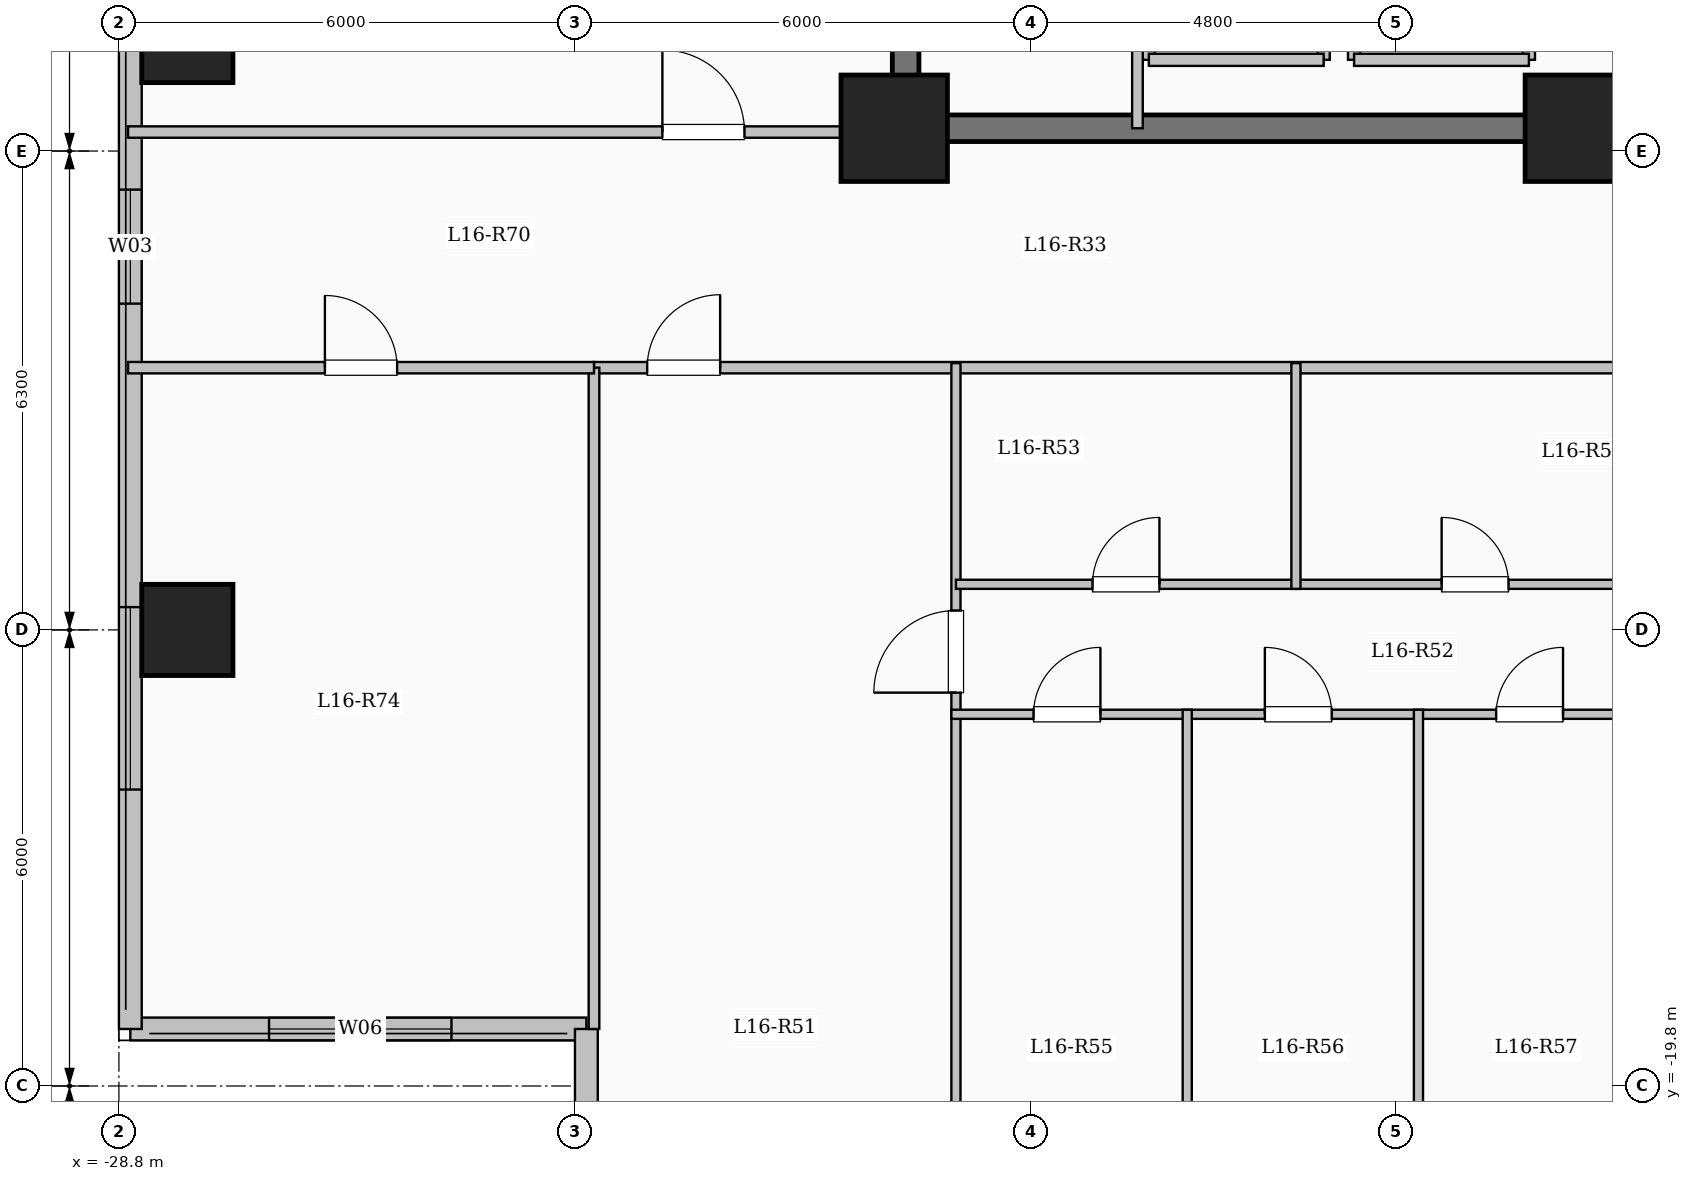
"""IFC4 building model, lengths in metres.
Left out: names, types, materials, properties, quantities, classifications, styles, units other than length and angle.
Written with IfcOpenShell. Run it as: python <this file> out.ifc"""

import sys

from ifc_helpers import new_model, si_unit, direction, frame, frame_2d, origin, origin_2d, place, context, subcontext, project, spatial, rectangle, extrude, element, fill, save


model = new_model("IFC4")
c1 = context("Model", 3, precision=1e-05, world=origin(), true_north=direction((0.0, 1.0)))
c2 = subcontext(c1, "Body", "Model", "MODEL_VIEW")
j1 = project(units=[si_unit("LENGTHUNIT", "METRE"), si_unit("PLANEANGLEUNIT", "RADIAN")], contexts=[c1])
p1 = place(None, origin())
s1 = spatial("IfcSite", under=j1, at=p1, CompositionType="ELEMENT")
p2 = place(p1, origin())
s2 = spatial("IfcBuilding", under=s1, at=p2, CompositionType="ELEMENT")
p3 = place(p2, frame((0.0, 0.0, 60.85)))
s3 = spatial("IfcBuildingStorey", under=s2, at=p3, CompositionType="ELEMENT", Elevation=60.85)
for number, where, z_axis, x_axis in (
    (1, (-9.6, -7.2, 0.0), (0.0, 0.0, 1.0), (1.0, 0.0, 0.0)),
    (2, (-18.6, -7.2, 0.0), (0.0, 0.0, 1.0), (1.0, 0.0, 0.0)),
):
    element("IfcColumn", number, at=place(p3, frame(where, z_axis=z_axis, x_axis=x_axis)), inside=s3, PredefinedType="COLUMN", context=c2, shape_type="SweptSolid", body=[
        extrude(rectangle(XDim=1.4, YDim=1.4, at=origin_2d()), origin(), (0.0, 0.0, 1.0), 3.35),
    ])
for number, where, z_axis, x_axis in (
    (3, (-27.9, -13.8, 0.0), (0.0, 0.0, 1.0), (1.0, 0.0, 0.0)),
    (4, (-27.9, -6.0, 0.0), (0.0, 0.0, 1.0), (1.0, 0.0, 0.0)),
):
    element("IfcColumn", number, at=place(p3, frame(where, z_axis=z_axis, x_axis=x_axis)), inside=s3, PredefinedType="COLUMN", context=c2, shape_type="SweptSolid", body=[
        extrude(rectangle(XDim=1.2, YDim=1.2, at=origin_2d()), origin(), (0.0, 0.0, 1.0), 3.35),
    ])
p4 = place(p3, frame((-22.65, -19.05, 0.0), z_axis=(0.0, 0.0, 1.0), x_axis=(-1.0, 0.0, 0.0)))
e5 = element("IfcWall", 5, at=p4, inside=s3, PredefinedType="SOLIDWALL", context=c2, shape_type="SweptSolid", body=[
    extrude(rectangle(XDim=6.0, YDim=0.3, at=frame_2d((3.0, 0.0))), origin(), (0.0, 0.0, 1.0), 3.05),
])
p5 = place(p4, frame((1.775, 0.0, 0.9)))
e6 = element("IfcOpeningElement", 6, at=p5, cuts=e5, PredefinedType="OPENING", context=c2, shape_type="SweptSolid", body=[
    extrude(rectangle(XDim=2.4, YDim=1.8, at=frame_2d((1.2, 0.9))), frame((0.0, 0.16, 0.0), z_axis=(0.0, -1.0, 0.0), x_axis=(1.0, 0.0, 0.0)), (0.0, 0.0, 1.0), 0.32),
])
p6 = place(p3, frame((-28.65, -19.05, 0.0), z_axis=(0.0, 0.0, 1.0), x_axis=(0.0, 1.0, 0.0)))
e7 = element("IfcWall", 7, at=p6, inside=s3, PredefinedType="SOLIDWALL", context=c2, shape_type="SweptSolid", body=[
    extrude(rectangle(XDim=38.1, YDim=0.3, at=frame_2d((19.05, 0.0))), origin(), (0.0, 0.0, 1.0), 3.05),
])
p7 = place(p6, frame((3.15, 0.0, 0.9)))
e8 = element("IfcOpeningElement", 8, at=p7, cuts=e7, PredefinedType="OPENING", context=c2, shape_type="SweptSolid", body=[
    extrude(rectangle(XDim=2.4, YDim=1.8, at=frame_2d((1.2, 0.9))), frame((0.0, 0.16, 0.0), z_axis=(0.0, -1.0, 0.0), x_axis=(1.0, 0.0, 0.0)), (0.0, 0.0, 1.0), 0.32),
])
p8 = place(p6, frame((9.542, 0.0, 0.9)))
e9 = element("IfcOpeningElement", 9, at=p8, cuts=e7, PredefinedType="OPENING", context=c2, shape_type="SweptSolid", body=[
    extrude(rectangle(XDim=1.5, YDim=1.65, at=frame_2d((0.75, 0.825))), frame((0.0, 0.16, 0.0), z_axis=(0.0, -1.0, 0.0), x_axis=(1.0, 0.0, 0.0)), (0.0, 0.0, 1.0), 0.32),
])
p9 = place(p6, frame((19.8, 0.0, 0.9)))
e10 = element("IfcOpeningElement", 10, at=p9, cuts=e7, PredefinedType="OPENING", context=c2, shape_type="SweptSolid", body=[
    extrude(rectangle(XDim=2.0, YDim=1.7, at=frame_2d((1.0, 0.85))), frame((0.0, 0.16, 0.0), z_axis=(0.0, -1.0, 0.0), x_axis=(1.0, 0.0, 0.0)), (0.0, 0.0, 1.0), 0.32),
])
p10 = place(p6, frame((30.175, 0.0, 0.95)))
e11 = element("IfcOpeningElement", 11, at=p10, cuts=e7, PredefinedType="OPENING", context=c2, shape_type="SweptSolid", body=[
    extrude(rectangle(XDim=1.0, YDim=1.5, at=frame_2d((0.5, 0.75))), frame((0.0, 0.16, 0.0), z_axis=(0.0, -1.0, 0.0), x_axis=(1.0, 0.0, 0.0)), (0.0, 0.0, 1.0), 0.32),
])
p11 = place(p6, frame((33.85, 0.0, 0.9)))
e12 = element("IfcOpeningElement", 12, at=p11, cuts=e7, PredefinedType="OPENING", context=c2, shape_type="SweptSolid", body=[
    extrude(rectangle(XDim=2.0, YDim=1.7, at=frame_2d((1.0, 0.85))), frame((0.0, 0.16, 0.0), z_axis=(0.0, -1.0, 0.0), x_axis=(1.0, 0.0, 0.0)), (0.0, 0.0, 1.0), 0.32),
])
p12 = place(p3, frame((-22.65, -23.55, 0.0), z_axis=(0.0, 0.0, 1.0), x_axis=(0.0, 1.0, 0.0)))
e13 = element("IfcWall", 13, at=p12, inside=s3, PredefinedType="SOLIDWALL", context=c2, shape_type="SweptSolid", body=[
    extrude(rectangle(XDim=4.5, YDim=0.3, at=frame_2d((2.25, 0.0))), origin(), (0.0, 0.0, 1.0), 3.05),
])
p13 = place(p12, frame((1.067, 0.0, 0.9)))
e14 = element("IfcOpeningElement", 14, at=p13, cuts=e13, PredefinedType="OPENING", context=c2, shape_type="SweptSolid", body=[
    extrude(rectangle(XDim=2.4, YDim=1.8, at=frame_2d((1.2, 0.9))), frame((0.0, 0.16, 0.0), z_axis=(0.0, -1.0, 0.0), x_axis=(1.0, 0.0, 0.0)), (0.0, 0.0, 1.0), 0.32),
])
p14 = place(p3, frame((-12.55, -6.3, 0.0), z_axis=(0.0, 0.0, 1.0), x_axis=(0.0, 1.0, 0.0)))
e15 = element("IfcWall", 15, at=p14, inside=s3, PredefinedType="SOLIDWALL", context=c2, shape_type="SweptSolid", body=[
    extrude(rectangle(XDim=2.6, YDim=0.16, at=frame_2d((1.3, 0.0))), origin(), (0.0, 0.0, 1.0), 3.05),
])
p15 = place(p3, frame((-10.25, -6.3, 0.0), z_axis=(0.0, 0.0, 1.0), x_axis=(0.0, 1.0, 0.0)))
e16 = element("IfcWall", 16, at=p15, inside=s3, PredefinedType="SOLIDWALL", context=c2, shape_type="SweptSolid", body=[
    extrude(rectangle(XDim=2.6, YDim=0.16, at=frame_2d((1.3, 0.0))), origin(), (0.0, 0.0, 1.0), 3.05),
])
p16 = place(p15, frame((0.75, 0.0, 0.0)))
e17 = element("IfcOpeningElement", 17, at=p16, cuts=e16, PredefinedType="OPENING", context=c2, shape_type="SweptSolid", body=[
    extrude(rectangle(XDim=1.1, YDim=2.15, at=frame_2d((0.55, 1.075))), frame((0.0, 0.09, 0.0), z_axis=(0.0, -1.0, 0.0), x_axis=(1.0, 0.0, 0.0)), (0.0, 0.0, 1.0), 0.18),
])
p17 = place(p3, frame((-12.55, -6.3, 0.0), z_axis=(0.0, 0.0, 1.0), x_axis=(1.0, 0.0, 0.0)))
e18 = element("IfcWall", 18, at=p17, inside=s3, PredefinedType="SOLIDWALL", context=c2, shape_type="SweptSolid", body=[
    extrude(rectangle(XDim=2.3, YDim=0.16, at=frame_2d((1.15, 0.0))), origin(), (0.0, 0.0, 1.0), 3.05),
])
for number, where, z_axis, x_axis in (
    (19, (-15.25, -6.3, 0.0), (0.0, 0.0, 1.0), (0.0, 1.0, 0.0)),
    (20, (-12.95, -6.3, 0.0), (0.0, 0.0, 1.0), (0.0, 1.0, 0.0)),
):
    element("IfcWall", number, at=place(p3, frame(where, z_axis=z_axis, x_axis=x_axis)), inside=s3, PredefinedType="SOLIDWALL", context=c2, shape_type="SweptSolid", body=[
        extrude(rectangle(XDim=2.6, YDim=0.16, at=frame_2d((1.3, 0.0))), origin(), (0.0, 0.0, 1.0), 3.05),
    ])
p18 = place(p3, frame((-15.25, -6.3, 0.0), z_axis=(0.0, 0.0, 1.0), x_axis=(1.0, 0.0, 0.0)))
e21 = element("IfcWall", 21, at=p18, inside=s3, PredefinedType="SOLIDWALL", context=c2, shape_type="SweptSolid", body=[
    extrude(rectangle(XDim=2.3, YDim=0.16, at=frame_2d((1.15, 0.0))), origin(), (0.0, 0.0, 1.0), 3.05),
])
p19 = place(p3, frame((-18.45, -7.375, 0.0), z_axis=(0.0, 0.0, 1.0), x_axis=(0.0, 1.0, 0.0)))
e22 = element("IfcWall", 22, at=p19, inside=s3, PredefinedType="SHEAR", context=c2, shape_type="SweptSolid", body=[
    extrude(rectangle(XDim=14.05, YDim=0.35, at=frame_2d((7.025, 0.0))), origin(), (0.0, 0.0, 1.0), 3.35),
])
p20 = place(p3, frame((-18.625, -7.2, 0.0), z_axis=(0.0, 0.0, 1.0), x_axis=(1.0, 0.0, 0.0)))
e23 = element("IfcWall", 23, at=p20, inside=s3, PredefinedType="SHEAR", context=c2, shape_type="SweptSolid", body=[
    extrude(rectangle(XDim=8.55, YDim=0.35, at=frame_2d((4.275, 0.0))), origin(), (0.0, 0.0, 1.0), 3.35),
])
p21 = place(p3, frame((-15.4, -7.2, 0.0), z_axis=(0.0, 0.0, 1.0), x_axis=(0.0, 1.0, 0.0)))
e24 = element("IfcWall", 24, at=p21, inside=s3, PredefinedType="PARTITIONING", context=c2, shape_type="SweptSolid", body=[
    extrude(rectangle(XDim=10.45, YDim=0.14, at=frame_2d((5.225, 0.0))), origin(), (0.0, 0.0, 1.0), 3.05),
])
p22 = place(p21, frame((9.25, 0.0, 0.0)))
e25 = element("IfcOpeningElement", 25, at=p22, cuts=e24, PredefinedType="OPENING", context=c2, shape_type="SweptSolid", body=[
    extrude(rectangle(XDim=0.9, YDim=2.08, at=frame_2d((0.45, 1.04))), frame((0.0, 0.08, 0.0), z_axis=(0.0, -1.0, 0.0), x_axis=(1.0, 0.0, 0.0)), (0.0, 0.0, 1.0), 0.16),
])
p23 = place(p3, frame((-22.55, -10.35, 0.0), z_axis=(0.0, 0.0, 1.0), x_axis=(1.0, 0.0, 0.0)))
e26 = element("IfcWall", 26, at=p23, inside=s3, PredefinedType="PARTITIONING", context=c2, shape_type="SweptSolid", body=[
    extrude(rectangle(XDim=14.0, YDim=0.15, at=frame_2d((7.0, 0.0))), origin(), (0.0, 0.0, 1.0), 3.05),
])
p24 = place(p23, frame((0.7, 0.0, 0.0)))
e27 = element("IfcOpeningElement", 27, at=p24, cuts=e26, PredefinedType="OPENING", context=c2, shape_type="SweptSolid", body=[
    extrude(rectangle(XDim=0.96, YDim=2.15, at=frame_2d((0.48, 1.075))), frame((0.0, 0.085, 0.0), z_axis=(0.0, -1.0, 0.0), x_axis=(1.0, 0.0, 0.0)), (0.0, 0.0, 1.0), 0.17),
])
p25 = place(p3, frame((-17.788, -23.6, 0.0), z_axis=(0.0, 0.0, 1.0), x_axis=(0.0, 1.0, 0.0)))
e28 = element("IfcWall", 28, at=p25, inside=s3, PredefinedType="PARTITIONING", context=c2, shape_type="SweptSolid", body=[
    extrude(rectangle(XDim=13.31, YDim=0.12, at=frame_2d((6.655, 0.0))), origin(), (0.0, 0.0, 1.0), 3.05),
])
p26 = place(p25, frame((8.975, 0.0, 0.0)))
e29 = element("IfcOpeningElement", 29, at=p26, cuts=e28, PredefinedType="OPENING", context=c2, shape_type="SweptSolid", body=[
    extrude(rectangle(XDim=1.08, YDim=2.15, at=frame_2d((0.54, 1.075))), frame((0.0, 0.07, 0.0), z_axis=(0.0, -1.0, 0.0), x_axis=(1.0, 0.0, 0.0)), (0.0, 0.0, 1.0), 0.14),
])
p27 = place(p3, frame((-17.788, -13.2, 0.0), z_axis=(0.0, 0.0, 1.0), x_axis=(1.0, 0.0, 0.0)))
e30 = element("IfcWall", 30, at=p27, inside=s3, PredefinedType="PARTITIONING", context=c2, shape_type="SweptSolid", body=[
    extrude(rectangle(XDim=4.473, YDim=0.12, at=frame_2d((2.237, 0.0))), origin(), (0.0, 0.0, 1.0), 3.05),
])
p28 = place(p27, frame((1.797, 0.0, 0.0)))
e31 = element("IfcOpeningElement", 31, at=p28, cuts=e30, PredefinedType="OPENING", context=c2, shape_type="SweptSolid", body=[
    extrude(rectangle(XDim=0.88, YDim=2.1, at=frame_2d((0.44, 1.05))), frame((0.0, 0.07, 0.0), z_axis=(0.0, -1.0, 0.0), x_axis=(1.0, 0.0, 0.0)), (0.0, 0.0, 1.0), 0.14),
])
p29 = place(p3, frame((-13.315, -13.2, 0.0), z_axis=(0.0, 0.0, 1.0), x_axis=(1.0, 0.0, 0.0)))
e32 = element("IfcWall", 32, at=p29, inside=s3, PredefinedType="PARTITIONING", context=c2, shape_type="SweptSolid", body=[
    extrude(rectangle(XDim=4.715, YDim=0.12, at=frame_2d((2.357, 0.0))), origin(), (0.0, 0.0, 1.0), 3.05),
])
p30 = place(p29, frame((1.917, 0.0, 0.0)))
e33 = element("IfcOpeningElement", 33, at=p30, cuts=e32, PredefinedType="OPENING", context=c2, shape_type="SweptSolid", body=[
    extrude(rectangle(XDim=0.88, YDim=2.1, at=frame_2d((0.44, 1.05))), frame((0.0, 0.07, 0.0), z_axis=(0.0, -1.0, 0.0), x_axis=(1.0, 0.0, 0.0)), (0.0, 0.0, 1.0), 0.14),
])
p31 = place(p3, frame((-17.848, -14.91, 0.0), z_axis=(0.0, 0.0, 1.0), x_axis=(1.0, 0.0, 0.0)))
e34 = element("IfcWall", 34, at=p31, inside=s3, PredefinedType="PARTITIONING", context=c2, shape_type="SweptSolid", body=[
    extrude(rectangle(XDim=9.308, YDim=0.12, at=frame_2d((4.654, 0.0))), origin(), (0.0, 0.0, 1.0), 2.535),
])
p32 = place(p31, frame((1.081, 0.0, 0.0)))
e35 = element("IfcOpeningElement", 35, at=p32, cuts=e34, PredefinedType="OPENING", context=c2, shape_type="SweptSolid", body=[
    extrude(rectangle(XDim=0.88, YDim=2.1, at=frame_2d((0.44, 1.05))), frame((0.0, 0.07, 0.0), z_axis=(0.0, -1.0, 0.0), x_axis=(1.0, 0.0, 0.0)), (0.0, 0.0, 1.0), 0.14),
])
p33 = place(p31, frame((4.124, 0.0, 0.0)))
e36 = element("IfcOpeningElement", 36, at=p33, cuts=e34, PredefinedType="OPENING", context=c2, shape_type="SweptSolid", body=[
    extrude(rectangle(XDim=0.88, YDim=2.1, at=frame_2d((0.44, 1.05))), frame((0.0, 0.07, 0.0), z_axis=(0.0, -1.0, 0.0), x_axis=(1.0, 0.0, 0.0)), (0.0, 0.0, 1.0), 0.14),
])
p34 = place(p31, frame((7.167, 0.0, 0.0)))
e37 = element("IfcOpeningElement", 37, at=p34, cuts=e34, PredefinedType="OPENING", context=c2, shape_type="SweptSolid", body=[
    extrude(rectangle(XDim=0.88, YDim=2.1, at=frame_2d((0.44, 1.05))), frame((0.0, 0.07, 0.0), z_axis=(0.0, -1.0, 0.0), x_axis=(1.0, 0.0, 0.0)), (0.0, 0.0, 1.0), 0.14),
])
p35 = place(p3, frame((-13.315, -13.26, 0.0), z_axis=(0.0, 0.0, 1.0), x_axis=(0.0, 1.0, 0.0)))
e38 = element("IfcWall", 38, at=p35, inside=s3, PredefinedType="PARTITIONING", context=c2, shape_type="SweptSolid", body=[
    extrude(rectangle(XDim=2.97, YDim=0.12, at=frame_2d((1.485, 0.0))), origin(), (0.0, 0.0, 1.0), 3.05),
])
p36 = place(p3, frame((-14.745, -23.6, 0.0), z_axis=(0.0, 0.0, 1.0), x_axis=(0.0, 1.0, 0.0)))
e39 = element("IfcWall", 39, at=p36, inside=s3, PredefinedType="PARTITIONING", context=c2, shape_type="SweptSolid", body=[
    extrude(rectangle(XDim=8.75, YDim=0.12, at=frame_2d((4.375, 0.0))), origin(), (0.0, 0.0, 1.0), 2.385),
])
p37 = place(p3, frame((-11.703, -23.6, 0.0), z_axis=(0.0, 0.0, 1.0), x_axis=(0.0, 1.0, 0.0)))
e40 = element("IfcWall", 40, at=p37, inside=s3, PredefinedType="PARTITIONING", context=c2, shape_type="SweptSolid", body=[
    extrude(rectangle(XDim=8.75, YDim=0.12, at=frame_2d((4.375, 0.0))), origin(), (0.0, 0.0, 1.0), 3.05),
])
p38 = place(p3, frame((-28.68, -7.25, 0.0), z_axis=(0.0, 0.0, 1.0), x_axis=(1.0, 0.0, 0.0)))
e41 = element("IfcWall", 41, at=p38, inside=s3, PredefinedType="PARTITIONING", context=c2, shape_type="SweptSolid", body=[
    extrude(rectangle(XDim=10.23, YDim=0.15, at=frame_2d((5.115, 0.0))), origin(), (0.0, 0.0, 1.0), 3.05),
])
p39 = place(p38, frame((7.03, 0.0, 0.0)))
e42 = element("IfcOpeningElement", 42, at=p39, cuts=e41, PredefinedType="OPENING", context=c2, shape_type="SweptSolid", body=[
    extrude(rectangle(XDim=1.08, YDim=2.15, at=frame_2d((0.54, 1.075))), frame((0.0, 0.085, 0.0), z_axis=(0.0, -1.0, 0.0), x_axis=(1.0, 0.0, 0.0)), (0.0, 0.0, 1.0), 0.17),
])
p40 = place(p3, frame((-22.55, -19.05, 0.0), z_axis=(0.0, 0.0, 1.0), x_axis=(0.0, 1.0, 0.0)))
e43 = element("IfcWall", 43, at=p40, inside=s3, PredefinedType="PARTITIONING", context=c2, shape_type="SweptSolid", body=[
    extrude(rectangle(XDim=8.7, YDim=0.14, at=frame_2d((4.35, 0.0))), origin(), (0.0, 0.0, 1.0), 3.05),
])
p41 = place(p3, frame((-28.68, -10.35, 0.0), z_axis=(0.0, 0.0, 1.0), x_axis=(1.0, 0.0, 0.0)))
e44 = element("IfcWall", 44, at=p41, inside=s3, PredefinedType="PARTITIONING", context=c2, shape_type="SweptSolid", body=[
    extrude(rectangle(XDim=6.13, YDim=0.15, at=frame_2d((3.065, 0.0))), origin(), (0.0, 0.0, 1.0), 3.05),
])
p42 = place(p41, frame((2.59, 0.0, 0.0)))
e45 = element("IfcOpeningElement", 45, at=p42, cuts=e44, PredefinedType="OPENING", context=c2, shape_type="SweptSolid", body=[
    extrude(rectangle(XDim=0.95, YDim=2.15, at=frame_2d((0.475, 1.075))), frame((0.0, 0.085, 0.0), z_axis=(0.0, -1.0, 0.0), x_axis=(1.0, 0.0, 0.0)), (0.0, 0.0, 1.0), 0.17),
])
p43 = place(p5, origin())
e46 = element("IfcWindow", 46, at=p43, inside=s3, PartitioningType="SINGLE_PANEL", PredefinedType="WINDOW", context=c2, shape_type="SweptSolid", body=[
    extrude(rectangle(XDim=2.4, YDim=1.8, at=frame_2d((1.2, 0.9))), frame((0.0, 0.03, 0.0), z_axis=(0.0, -1.0, 0.0), x_axis=(1.0, 0.0, 0.0)), (0.0, 0.0, 1.0), 0.06),
])
fill(e6, e46)
p44 = place(p7, origin())
e47 = element("IfcWindow", 47, at=p44, inside=s3, PartitioningType="SINGLE_PANEL", PredefinedType="WINDOW", context=c2, shape_type="SweptSolid", body=[
    extrude(rectangle(XDim=2.4, YDim=1.8, at=frame_2d((1.2, 0.9))), frame((0.0, 0.03, 0.0), z_axis=(0.0, -1.0, 0.0), x_axis=(1.0, 0.0, 0.0)), (0.0, 0.0, 1.0), 0.06),
])
fill(e8, e47)
p45 = place(p8, origin())
e48 = element("IfcWindow", 48, at=p45, inside=s3, PartitioningType="SINGLE_PANEL", PredefinedType="WINDOW", context=c2, shape_type="SweptSolid", body=[
    extrude(rectangle(XDim=1.5, YDim=1.65, at=frame_2d((0.75, 0.825))), frame((0.0, 0.03, 0.0), z_axis=(0.0, -1.0, 0.0), x_axis=(1.0, 0.0, 0.0)), (0.0, 0.0, 1.0), 0.06),
])
fill(e9, e48)
p46 = place(p24, origin())
e49 = element("IfcDoor", 49, at=p46, inside=s3, OperationType="SINGLE_SWING_RIGHT", PredefinedType="DOOR", context=c2, shape_type="SweptSolid", body=[
    extrude(rectangle(XDim=0.96, YDim=2.15, at=frame_2d((0.48, 1.075))), frame((0.0, 0.025, 0.0), z_axis=(0.0, -1.0, 0.0), x_axis=(1.0, 0.0, 0.0)), (0.0, 0.0, 1.0), 0.05),
])
fill(e27, e49)
p47 = place(p26, origin())
e50 = element("IfcDoor", 50, at=p47, inside=s3, OperationType="SINGLE_SWING_LEFT", PredefinedType="DOOR", context=c2, shape_type="SweptSolid", body=[
    extrude(rectangle(XDim=1.08, YDim=2.15, at=frame_2d((0.54, 1.075))), frame((0.0, 0.025, 0.0), z_axis=(0.0, -1.0, 0.0), x_axis=(1.0, 0.0, 0.0)), (0.0, 0.0, 1.0), 0.05),
])
fill(e29, e50)
p48 = place(p28, origin())
e51 = element("IfcDoor", 51, at=p48, inside=s3, OperationType="SINGLE_SWING_RIGHT", PredefinedType="DOOR", context=c2, shape_type="SweptSolid", body=[
    extrude(rectangle(XDim=0.88, YDim=2.1, at=frame_2d((0.44, 1.05))), frame((0.0, 0.025, 0.0), z_axis=(0.0, -1.0, 0.0), x_axis=(1.0, 0.0, 0.0)), (0.0, 0.0, 1.0), 0.05),
])
fill(e31, e51)
p49 = place(p30, origin())
e52 = element("IfcDoor", 52, at=p49, inside=s3, OperationType="SINGLE_SWING_LEFT", PredefinedType="DOOR", context=c2, shape_type="SweptSolid", body=[
    extrude(rectangle(XDim=0.88, YDim=2.1, at=frame_2d((0.44, 1.05))), frame((0.0, 0.025, 0.0), z_axis=(0.0, -1.0, 0.0), x_axis=(1.0, 0.0, 0.0)), (0.0, 0.0, 1.0), 0.05),
])
fill(e33, e52)
p50 = place(p32, origin())
e53 = element("IfcDoor", 53, at=p50, inside=s3, OperationType="SINGLE_SWING_RIGHT", PredefinedType="DOOR", context=c2, shape_type="SweptSolid", body=[
    extrude(rectangle(XDim=0.88, YDim=2.1, at=frame_2d((0.44, 1.05))), frame((0.0, 0.025, 0.0), z_axis=(0.0, -1.0, 0.0), x_axis=(1.0, 0.0, 0.0)), (0.0, 0.0, 1.0), 0.05),
])
fill(e35, e53)
p51 = place(p33, origin())
e54 = element("IfcDoor", 54, at=p51, inside=s3, OperationType="SINGLE_SWING_LEFT", PredefinedType="DOOR", context=c2, shape_type="SweptSolid", body=[
    extrude(rectangle(XDim=0.88, YDim=2.1, at=frame_2d((0.44, 1.05))), frame((0.0, 0.025, 0.0), z_axis=(0.0, -1.0, 0.0), x_axis=(1.0, 0.0, 0.0)), (0.0, 0.0, 1.0), 0.05),
])
fill(e36, e54)
p52 = place(p34, origin())
e55 = element("IfcDoor", 55, at=p52, inside=s3, OperationType="SINGLE_SWING_RIGHT", PredefinedType="DOOR", context=c2, shape_type="SweptSolid", body=[
    extrude(rectangle(XDim=0.88, YDim=2.1, at=frame_2d((0.44, 1.05))), frame((0.0, 0.025, 0.0), z_axis=(0.0, -1.0, 0.0), x_axis=(1.0, 0.0, 0.0)), (0.0, 0.0, 1.0), 0.05),
])
fill(e37, e55)
p53 = place(p42, origin())
e56 = element("IfcDoor", 56, at=p53, inside=s3, OperationType="SINGLE_SWING_LEFT", PredefinedType="DOOR", context=c2, shape_type="SweptSolid", body=[
    extrude(rectangle(XDim=0.95, YDim=2.15, at=frame_2d((0.475, 1.075))), frame((0.0, 0.025, 0.0), z_axis=(0.0, -1.0, 0.0), x_axis=(1.0, 0.0, 0.0)), (0.0, 0.0, 1.0), 0.05),
])
fill(e45, e56)
p54 = place(p39, origin())
e57 = element("IfcDoor", 57, at=p54, inside=s3, OperationType="SINGLE_SWING_LEFT", PredefinedType="DOOR", context=c2, shape_type="SweptSolid", body=[
    extrude(rectangle(XDim=1.08, YDim=2.15, at=frame_2d((0.54, 1.075))), frame((0.0, 0.025, 0.0), z_axis=(0.0, -1.0, 0.0), x_axis=(1.0, 0.0, 0.0)), (0.0, 0.0, 1.0), 0.05),
])
fill(e42, e57)
save(model, sys.argv[1])
